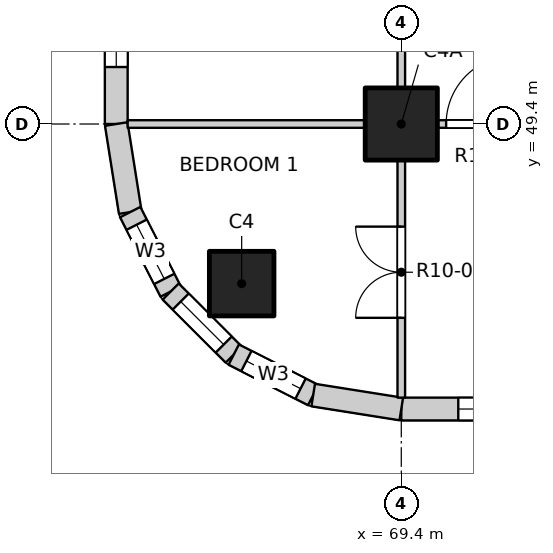
"""IFC4 building model, lengths in metres.
Left out: names, types, materials, properties, quantities, classifications, styles, units other than length and angle.
Written with IfcOpenShell. Run it as: python <this file> out.ifc"""

import sys

from ifc_helpers import new_model, si_unit, direction, frame, frame_2d, origin, origin_2d, place, context, subcontext, project, spatial, rectangle, extrude, element, fill, save


model = new_model("IFC4")
c1 = context("Model", 3, precision=1e-05, world=origin(), true_north=direction((0.0, 1.0)))
c2 = subcontext(c1, "Body", "Model", "MODEL_VIEW")
j1 = project(units=[si_unit("LENGTHUNIT", "METRE"), si_unit("PLANEANGLEUNIT", "RADIAN")], contexts=[c1])
p1 = place(None, origin())
s1 = spatial("IfcSite", under=j1, at=p1, CompositionType="ELEMENT")
p2 = place(p1, origin())
s2 = spatial("IfcBuilding", under=s1, at=p2, CompositionType="ELEMENT")
p3 = place(p2, frame((0.0, 0.0, 123.7)))
s3 = spatial("IfcBuildingStorey", under=s2, at=p3, CompositionType="ELEMENT", Elevation=123.7)
p4 = place(p3, frame((67.3, 47.3, -0.3), z_axis=(0.0, 0.0, 1.0), x_axis=(1.0, 0.0, 0.0)))
e1 = element("IfcColumn", 1, at=p4, inside=s3, PredefinedType="COLUMN", context=c2, shape_type="SweptSolid", body=[
    extrude(rectangle(XDim=0.85, YDim=0.85, at=origin_2d()), origin(), (0.0, 0.0, 1.0), 3.45),
])
p5 = place(p3, frame((69.4, 49.4, -0.3), z_axis=(0.0, 0.0, 1.0), x_axis=(1.0, 0.0, 0.0)))
e2 = element("IfcColumn", 2, at=p5, inside=s3, PredefinedType="COLUMN", context=c2, shape_type="SweptSolid", body=[
    extrude(rectangle(XDim=0.95, YDim=0.95, at=origin_2d()), origin(), (0.0, 0.0, 1.0), 3.45),
])
p6 = place(p3, frame((69.4, 45.65, 0.0), z_axis=(0.0, 0.0, 1.0), x_axis=(1.0, 0.0, 0.0)))
e3 = element("IfcWall", 3, at=p6, inside=s3, PredefinedType="SOLIDWALL", context=c2, shape_type="SweptSolid", body=[
    extrude(rectangle(XDim=3.475, YDim=0.3, at=frame_2d((1.738, 0.0))), origin(), (0.0, 0.0, 1.0), 2.7),
])
p7 = place(p6, frame((0.75, 0.0, 0.9)))
e4 = element("IfcOpeningElement", 4, at=p7, cuts=e3, PredefinedType="OPENING", context=c2, shape_type="SweptSolid", body=[
    extrude(rectangle(XDim=2.4, YDim=1.8, at=frame_2d((1.2, 0.9))), frame((0.0, 0.16, 0.0), z_axis=(0.0, -1.0, 0.0), x_axis=(1.0, 0.0, 0.0)), (0.0, 0.0, 1.0), 0.32),
])
p8 = place(p3, frame((65.65, 49.4, 0.0), z_axis=(0.0, 0.0, 1.0), x_axis=(0.0, 1.0, 0.0)))
e5 = element("IfcWall", 5, at=p8, inside=s3, PredefinedType="SOLIDWALL", context=c2, shape_type="SweptSolid", body=[
    extrude(rectangle(XDim=3.475, YDim=0.3, at=frame_2d((1.738, 0.0))), origin(), (0.0, 0.0, 1.0), 2.7),
])
p9 = place(p8, frame((0.75, 0.0, 0.9)))
e6 = element("IfcOpeningElement", 6, at=p9, cuts=e5, PredefinedType="OPENING", context=c2, shape_type="SweptSolid", body=[
    extrude(rectangle(XDim=2.4, YDim=1.8, at=frame_2d((1.2, 0.9))), frame((0.0, 0.16, 0.0), z_axis=(0.0, -1.0, 0.0), x_axis=(1.0, 0.0, 0.0)), (0.0, 0.0, 1.0), 0.32),
])
p10 = place(p3, frame((65.65, 49.4, 0.0), z_axis=(0.0, 0.0, 1.0), x_axis=(0.156496880861, -0.987678452879, 0.0)))
e7 = element("IfcWall", 7, at=p10, inside=s3, PredefinedType="SOLIDWALL", context=c2, shape_type="SweptSolid", body=[
    extrude(rectangle(XDim=1.173, YDim=0.3, at=frame_2d((0.586, 0.0))), origin(), (0.0, 0.0, 1.0), 2.7),
])
p11 = place(p3, frame((65.833, 48.241, 0.0), z_axis=(0.0, 0.0, 1.0), x_axis=(0.454025524128, -0.890988677504, 0.0)))
e8 = element("IfcWall", 8, at=p11, inside=s3, PredefinedType="SOLIDWALL", context=c2, shape_type="SweptSolid", body=[
    extrude(rectangle(XDim=1.173, YDim=0.3, at=frame_2d((0.587, 0.0))), origin(), (0.0, 0.0, 1.0), 2.7),
])
p12 = place(p11, frame((0.187, 0.0, 0.9)))
e9 = element("IfcOpeningElement", 9, at=p12, cuts=e8, PredefinedType="OPENING", context=c2, shape_type="SweptSolid", body=[
    extrude(rectangle(XDim=0.8, YDim=1.2, at=frame_2d((0.4, 0.6))), frame((0.0, 0.16, 0.0), z_axis=(0.0, -1.0, 0.0), x_axis=(1.0, 0.0, 0.0)), (0.0, 0.0, 1.0), 0.32),
])
p13 = place(p3, frame((66.366, 47.196, 0.0), z_axis=(0.0, 0.0, 1.0), x_axis=(0.707106781187, -0.707106781187, 0.0)))
e10 = element("IfcWall", 10, at=p13, inside=s3, PredefinedType="SOLIDWALL", context=c2, shape_type="SweptSolid", body=[
    extrude(rectangle(XDim=1.173, YDim=0.3, at=frame_2d((0.586, 0.0))), origin(), (0.0, 0.0, 1.0), 2.7),
])
p14 = place(p13, frame((0.187, 0.0, 0.9)))
e11 = element("IfcOpeningElement", 11, at=p14, cuts=e10, PredefinedType="OPENING", context=c2, shape_type="SweptSolid", body=[
    extrude(rectangle(XDim=0.8, YDim=1.2, at=frame_2d((0.4, 0.6))), frame((0.0, 0.16, 0.0), z_axis=(0.0, -1.0, 0.0), x_axis=(1.0, 0.0, 0.0)), (0.0, 0.0, 1.0), 0.32),
])
p15 = place(p3, frame((67.196, 46.366, 0.0), z_axis=(0.0, 0.0, 1.0), x_axis=(0.890988677504, -0.454025524128, 0.0)))
e12 = element("IfcWall", 12, at=p15, inside=s3, PredefinedType="SOLIDWALL", context=c2, shape_type="SweptSolid", body=[
    extrude(rectangle(XDim=1.173, YDim=0.3, at=frame_2d((0.587, 0.0))), origin(), (0.0, 0.0, 1.0), 2.7),
])
p16 = place(p15, frame((0.187, 0.0, 0.9)))
e13 = element("IfcOpeningElement", 13, at=p16, cuts=e12, PredefinedType="OPENING", context=c2, shape_type="SweptSolid", body=[
    extrude(rectangle(XDim=0.8, YDim=1.2, at=frame_2d((0.4, 0.6))), frame((0.0, 0.16, 0.0), z_axis=(0.0, -1.0, 0.0), x_axis=(1.0, 0.0, 0.0)), (0.0, 0.0, 1.0), 0.32),
])
p17 = place(p3, frame((68.241, 45.833, 0.0), z_axis=(0.0, 0.0, 1.0), x_axis=(0.987678452879, -0.156496880861, 0.0)))
e14 = element("IfcWall", 14, at=p17, inside=s3, PredefinedType="SOLIDWALL", context=c2, shape_type="SweptSolid", body=[
    extrude(rectangle(XDim=1.173, YDim=0.3, at=frame_2d((0.586, 0.0))), origin(), (0.0, 0.0, 1.0), 2.7),
])
p18 = place(p3, frame((65.8, 49.4, 0.0), z_axis=(0.0, 0.0, 1.0), x_axis=(1.0, 0.0, 0.0)))
e15 = element("IfcWall", 15, at=p18, inside=s3, PredefinedType="PARTITIONING", context=c2, shape_type="SweptSolid", body=[
    extrude(rectangle(XDim=38.4, YDim=0.1, at=frame_2d((19.2, 0.0))), origin(), (0.0, 0.0, 1.0), 3.15),
])
p19 = place(p18, frame((4.19, 0.0, 0.0)))
e16 = element("IfcOpeningElement", 16, at=p19, cuts=e15, PredefinedType="OPENING", context=c2, shape_type="SweptSolid", body=[
    extrude(rectangle(XDim=0.9, YDim=2.1, at=frame_2d((0.45, 1.05))), frame((0.0, 0.06, 0.0), z_axis=(0.0, -1.0, 0.0), x_axis=(1.0, 0.0, 0.0)), (0.0, 0.0, 1.0), 0.12),
])
p20 = place(p18, frame((9.0, 0.0, 0.0)))
e17 = element("IfcOpeningElement", 17, at=p20, cuts=e15, PredefinedType="OPENING", context=c2, shape_type="SweptSolid", body=[
    extrude(rectangle(XDim=0.9, YDim=2.1, at=frame_2d((0.45, 1.05))), frame((0.0, 0.06, 0.0), z_axis=(0.0, -1.0, 0.0), x_axis=(1.0, 0.0, 0.0)), (0.0, 0.0, 1.0), 0.12),
])
p21 = place(p18, frame((12.9, 0.0, 0.0)))
e18 = element("IfcOpeningElement", 18, at=p21, cuts=e15, PredefinedType="OPENING", context=c2, shape_type="SweptSolid", body=[
    extrude(rectangle(XDim=0.9, YDim=2.1, at=frame_2d((0.45, 1.05))), frame((0.0, 0.06, 0.0), z_axis=(0.0, -1.0, 0.0), x_axis=(1.0, 0.0, 0.0)), (0.0, 0.0, 1.0), 0.12),
])
p22 = place(p18, frame((16.8, 0.0, 0.0)))
e19 = element("IfcOpeningElement", 19, at=p22, cuts=e15, PredefinedType="OPENING", context=c2, shape_type="SweptSolid", body=[
    extrude(rectangle(XDim=0.9, YDim=2.1, at=frame_2d((0.45, 1.05))), frame((0.0, 0.06, 0.0), z_axis=(0.0, -1.0, 0.0), x_axis=(1.0, 0.0, 0.0)), (0.0, 0.0, 1.0), 0.12),
])
p23 = place(p18, frame((22.5, 0.0, 0.0)))
e20 = element("IfcOpeningElement", 20, at=p23, cuts=e15, PredefinedType="OPENING", context=c2, shape_type="SweptSolid", body=[
    extrude(rectangle(XDim=1.2, YDim=2.1, at=frame_2d((0.6, 1.05))), frame((0.0, 0.06, 0.0), z_axis=(0.0, -1.0, 0.0), x_axis=(1.0, 0.0, 0.0)), (0.0, 0.0, 1.0), 0.12),
])
p24 = place(p18, frame((28.5, 0.0, 0.0)))
e21 = element("IfcOpeningElement", 21, at=p24, cuts=e15, PredefinedType="OPENING", context=c2, shape_type="SweptSolid", body=[
    extrude(rectangle(XDim=0.9, YDim=2.1, at=frame_2d((0.45, 1.05))), frame((0.0, 0.06, 0.0), z_axis=(0.0, -1.0, 0.0), x_axis=(1.0, 0.0, 0.0)), (0.0, 0.0, 1.0), 0.12),
])
p25 = place(p18, frame((33.31, 0.0, 0.0)))
e22 = element("IfcOpeningElement", 22, at=p25, cuts=e15, PredefinedType="OPENING", context=c2, shape_type="SweptSolid", body=[
    extrude(rectangle(XDim=0.9, YDim=2.1, at=frame_2d((0.45, 1.05))), frame((0.0, 0.06, 0.0), z_axis=(0.0, -1.0, 0.0), x_axis=(1.0, 0.0, 0.0)), (0.0, 0.0, 1.0), 0.12),
])
p26 = place(p3, frame((69.4, 45.8, 0.0), z_axis=(0.0, 0.0, 1.0), x_axis=(0.0, 1.0, 0.0)))
e23 = element("IfcWall", 23, at=p26, inside=s3, PredefinedType="PARTITIONING", context=c2, shape_type="SweptSolid", body=[
    extrude(rectangle(XDim=38.4, YDim=0.1, at=frame_2d((19.2, 0.0))), origin(), (0.0, 0.0, 1.0), 3.15),
])
p27 = place(p26, frame((1.05, 0.0, 0.0)))
e24 = element("IfcOpeningElement", 24, at=p27, cuts=e23, PredefinedType="OPENING", context=c2, shape_type="SweptSolid", body=[
    extrude(rectangle(XDim=1.2, YDim=2.1, at=frame_2d((0.6, 1.05))), frame((0.0, 0.06, 0.0), z_axis=(0.0, -1.0, 0.0), x_axis=(1.0, 0.0, 0.0)), (0.0, 0.0, 1.0), 0.12),
])
p28 = place(p26, frame((5.1, 0.0, 0.0)))
e25 = element("IfcOpeningElement", 25, at=p28, cuts=e23, PredefinedType="OPENING", context=c2, shape_type="SweptSolid", body=[
    extrude(rectangle(XDim=0.9, YDim=2.1, at=frame_2d((0.45, 1.05))), frame((0.0, 0.06, 0.0), z_axis=(0.0, -1.0, 0.0), x_axis=(1.0, 0.0, 0.0)), (0.0, 0.0, 1.0), 0.12),
])
p29 = place(p26, frame((9.0, 0.0, 0.0)))
e26 = element("IfcOpeningElement", 26, at=p29, cuts=e23, PredefinedType="OPENING", context=c2, shape_type="SweptSolid", body=[
    extrude(rectangle(XDim=0.9, YDim=2.1, at=frame_2d((0.45, 1.05))), frame((0.0, 0.06, 0.0), z_axis=(0.0, -1.0, 0.0), x_axis=(1.0, 0.0, 0.0)), (0.0, 0.0, 1.0), 0.12),
])
p30 = place(p26, frame((12.9, 0.0, 0.0)))
e27 = element("IfcOpeningElement", 27, at=p30, cuts=e23, PredefinedType="OPENING", context=c2, shape_type="SweptSolid", body=[
    extrude(rectangle(XDim=0.9, YDim=2.1, at=frame_2d((0.45, 1.05))), frame((0.0, 0.06, 0.0), z_axis=(0.0, -1.0, 0.0), x_axis=(1.0, 0.0, 0.0)), (0.0, 0.0, 1.0), 0.12),
])
p31 = place(p26, frame((19.775, 0.0, 0.0)))
e28 = element("IfcOpeningElement", 28, at=p31, cuts=e23, PredefinedType="OPENING", context=c2, shape_type="SweptSolid", body=[
    extrude(rectangle(XDim=1.2, YDim=2.1, at=frame_2d((0.6, 1.05))), frame((0.0, 0.06, 0.0), z_axis=(0.0, -1.0, 0.0), x_axis=(1.0, 0.0, 0.0)), (0.0, 0.0, 1.0), 0.12),
])
p32 = place(p26, frame((24.6, 0.0, 0.0)))
e29 = element("IfcOpeningElement", 29, at=p32, cuts=e23, PredefinedType="OPENING", context=c2, shape_type="SweptSolid", body=[
    extrude(rectangle(XDim=0.9, YDim=2.1, at=frame_2d((0.45, 1.05))), frame((0.0, 0.06, 0.0), z_axis=(0.0, -1.0, 0.0), x_axis=(1.0, 0.0, 0.0)), (0.0, 0.0, 1.0), 0.12),
])
p33 = place(p26, frame((30.3, 0.0, 0.0)))
e30 = element("IfcOpeningElement", 30, at=p33, cuts=e23, PredefinedType="OPENING", context=c2, shape_type="SweptSolid", body=[
    extrude(rectangle(XDim=1.2, YDim=2.1, at=frame_2d((0.6, 1.05))), frame((0.0, 0.06, 0.0), z_axis=(0.0, -1.0, 0.0), x_axis=(1.0, 0.0, 0.0)), (0.0, 0.0, 1.0), 0.12),
])
p34 = place(p26, frame((36.15, 0.0, 0.0)))
e31 = element("IfcOpeningElement", 31, at=p34, cuts=e23, PredefinedType="OPENING", context=c2, shape_type="SweptSolid", body=[
    extrude(rectangle(XDim=1.2, YDim=2.1, at=frame_2d((0.6, 1.05))), frame((0.0, 0.06, 0.0), z_axis=(0.0, -1.0, 0.0), x_axis=(1.0, 0.0, 0.0)), (0.0, 0.0, 1.0), 0.12),
])
p35 = place(p7, origin())
e32 = element("IfcWindow", 32, at=p35, inside=s3, PartitioningType="DOUBLE_PANEL_VERTICAL", PredefinedType="WINDOW", context=c2, shape_type="SweptSolid", body=[
    extrude(rectangle(XDim=2.4, YDim=1.8, at=frame_2d((1.2, 0.9))), frame((0.0, 0.03, 0.0), z_axis=(0.0, -1.0, 0.0), x_axis=(1.0, 0.0, 0.0)), (0.0, 0.0, 1.0), 0.06),
])
fill(e4, e32)
p36 = place(p9, origin())
e33 = element("IfcWindow", 33, at=p36, inside=s3, PartitioningType="DOUBLE_PANEL_VERTICAL", PredefinedType="WINDOW", context=c2, shape_type="SweptSolid", body=[
    extrude(rectangle(XDim=2.4, YDim=1.8, at=frame_2d((1.2, 0.9))), frame((0.0, 0.03, 0.0), z_axis=(0.0, -1.0, 0.0), x_axis=(1.0, 0.0, 0.0)), (0.0, 0.0, 1.0), 0.06),
])
fill(e6, e33)
p37 = place(p12, origin())
e34 = element("IfcWindow", 34, at=p37, inside=s3, PartitioningType="SINGLE_PANEL", PredefinedType="WINDOW", context=c2, shape_type="SweptSolid", body=[
    extrude(rectangle(XDim=0.8, YDim=1.2, at=frame_2d((0.4, 0.6))), frame((0.0, 0.03, 0.0), z_axis=(0.0, -1.0, 0.0), x_axis=(1.0, 0.0, 0.0)), (0.0, 0.0, 1.0), 0.06),
])
fill(e9, e34)
p38 = place(p14, origin())
e35 = element("IfcWindow", 35, at=p38, inside=s3, PartitioningType="SINGLE_PANEL", PredefinedType="WINDOW", context=c2, shape_type="SweptSolid", body=[
    extrude(rectangle(XDim=0.8, YDim=1.2, at=frame_2d((0.4, 0.6))), frame((0.0, 0.03, 0.0), z_axis=(0.0, -1.0, 0.0), x_axis=(1.0, 0.0, 0.0)), (0.0, 0.0, 1.0), 0.06),
])
fill(e11, e35)
p39 = place(p16, origin())
e36 = element("IfcWindow", 36, at=p39, inside=s3, PartitioningType="SINGLE_PANEL", PredefinedType="WINDOW", context=c2, shape_type="SweptSolid", body=[
    extrude(rectangle(XDim=0.8, YDim=1.2, at=frame_2d((0.4, 0.6))), frame((0.0, 0.03, 0.0), z_axis=(0.0, -1.0, 0.0), x_axis=(1.0, 0.0, 0.0)), (0.0, 0.0, 1.0), 0.06),
])
fill(e13, e36)
p40 = place(p27, origin())
e37 = element("IfcDoor", 37, at=p40, inside=s3, OperationType="DOUBLE_DOOR_SINGLE_SWING", PredefinedType="DOOR", context=c2, shape_type="SweptSolid", body=[
    extrude(rectangle(XDim=1.2, YDim=2.1, at=frame_2d((0.6, 1.05))), frame((0.0, 0.025, 0.0), z_axis=(0.0, -1.0, 0.0), x_axis=(1.0, 0.0, 0.0)), (0.0, 0.0, 1.0), 0.05),
])
fill(e24, e37)
p41 = place(p19, origin())
e38 = element("IfcDoor", 38, at=p41, inside=s3, OperationType="SINGLE_SWING_RIGHT", PredefinedType="DOOR", context=c2, shape_type="SweptSolid", body=[
    extrude(rectangle(XDim=0.9, YDim=2.1, at=frame_2d((0.45, 1.05))), frame((0.0, 0.025, 0.0), z_axis=(0.0, -1.0, 0.0), x_axis=(1.0, 0.0, 0.0)), (0.0, 0.0, 1.0), 0.05),
])
fill(e16, e38)
save(model, sys.argv[1])
